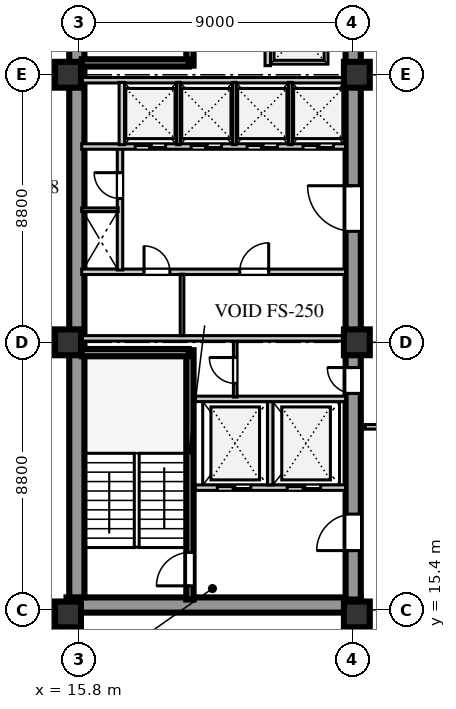
"""IFC4 building model, lengths in metres.
Left out: names, types, materials, properties, quantities, classifications, styles, units other than length and angle.
Written with IfcOpenShell. Run it as: python <this file> out.ifc"""

import sys

from ifc_helpers import new_model, si_unit, direction, frame, frame_2d, origin, origin_2d, place, context, subcontext, project, spatial, rectangle, extrude, element, fill, save


model = new_model("IFC4")
c1 = context("Model", 3, precision=1e-05, world=origin(), true_north=direction((0.0, 1.0)))
c2 = subcontext(c1, "Body", "Model", "MODEL_VIEW")
j1 = project(units=[si_unit("LENGTHUNIT", "METRE"), si_unit("PLANEANGLEUNIT", "RADIAN")], contexts=[c1])
p1 = place(None, origin())
s1 = spatial("IfcSite", under=j1, at=p1, CompositionType="ELEMENT")
p2 = place(p1, origin())
s2 = spatial("IfcBuilding", under=s1, at=p2, CompositionType="ELEMENT")
p3 = place(p2, frame((0.0, 0.0, 134.8)))
s3 = spatial("IfcBuildingStorey", under=s2, at=p3, CompositionType="ELEMENT", Elevation=134.8)
p4 = place(p3, frame((15.4, 15.56, 0.0), z_axis=(0.0, 0.0, 1.0), x_axis=(1.0, 0.0, 0.0)))
e1 = element("IfcWall", 1, at=p4, inside=s3, PredefinedType="SHEAR", context=c2, shape_type="SweptSolid", body=[
    extrude(rectangle(XDim=9.68, YDim=0.5, at=frame_2d((4.84, 0.0))), origin(), (0.0, 0.0, 1.0), 3.6),
])
p5 = place(p3, frame((15.74, 15.81, 0.0), z_axis=(0.0, 0.0, 1.0), x_axis=(0.0, 1.0, 0.0)))
e2 = element("IfcWall", 2, at=p5, inside=s3, PredefinedType="SHEAR", context=c2, shape_type="SweptSolid", body=[
    extrude(rectangle(XDim=25.63, YDim=0.5, at=frame_2d((12.815, 0.0))), origin(), (0.0, 0.0, 1.0), 3.6),
])
p6 = place(p3, frame((24.83, 15.74, 0.0), z_axis=(0.0, 0.0, 1.0), x_axis=(0.0, 1.0, 0.0)))
e3 = element("IfcWall", 3, at=p6, inside=s3, PredefinedType="SHEAR", context=c2, shape_type="SweptSolid", body=[
    extrude(rectangle(XDim=25.76, YDim=0.5, at=frame_2d((12.88, 0.0))), origin(), (0.0, 0.0, 1.0), 3.6),
])
p7 = place(p6, frame((1.61, 0.0, 0.0)))
e4 = element("IfcOpeningElement", 4, at=p7, cuts=e3, PredefinedType="OPENING", context=c2, shape_type="SweptSolid", body=[
    extrude(rectangle(XDim=1.2, YDim=2.1, at=frame_2d((0.6, 1.05))), frame((0.0, 0.26, 0.0), z_axis=(0.0, -1.0, 0.0), x_axis=(1.0, 0.0, 0.0)), (0.0, 0.0, 1.0), 0.52),
])
p8 = place(p6, frame((6.78, 0.0, 0.0)))
e5 = element("IfcOpeningElement", 5, at=p8, cuts=e3, PredefinedType="OPENING", context=c2, shape_type="SweptSolid", body=[
    extrude(rectangle(XDim=0.85, YDim=2.06, at=frame_2d((0.425, 1.03))), frame((0.0, 0.26, 0.0), z_axis=(0.0, -1.0, 0.0), x_axis=(1.0, 0.0, 0.0)), (0.0, 0.0, 1.0), 0.52),
])
p9 = place(p6, frame((12.11, 0.0, 0.0)))
e6 = element("IfcOpeningElement", 6, at=p9, cuts=e3, PredefinedType="OPENING", context=c2, shape_type="SweptSolid", body=[
    extrude(rectangle(XDim=1.5, YDim=2.12, at=frame_2d((0.75, 1.06))), frame((0.0, 0.26, 0.0), z_axis=(0.0, -1.0, 0.0), x_axis=(1.0, 0.0, 0.0)), (0.0, 0.0, 1.0), 0.52),
])
p10 = place(p6, frame((20.11, 0.0, 0.0)))
e7 = element("IfcOpeningElement", 7, at=p10, cuts=e3, PredefinedType="OPENING", context=c2, shape_type="SweptSolid", body=[
    extrude(rectangle(XDim=1.2, YDim=2.12, at=frame_2d((0.6, 1.06))), frame((0.0, 0.26, 0.0), z_axis=(0.0, -1.0, 0.0), x_axis=(1.0, 0.0, 0.0)), (0.0, 0.0, 1.0), 0.52),
])
p11 = place(p6, frame((24.01, 0.0, 0.0)))
e8 = element("IfcOpeningElement", 8, at=p11, cuts=e3, PredefinedType="OPENING", context=c2, shape_type="SweptSolid", body=[
    extrude(rectangle(XDim=0.95, YDim=2.1, at=frame_2d((0.475, 1.05))), frame((0.0, 0.26, 0.0), z_axis=(0.0, -1.0, 0.0), x_axis=(1.0, 0.0, 0.0)), (0.0, 0.0, 1.0), 0.52),
])
for number, where, z_axis, x_axis in (
    (9, (15.45, 15.25, 0.0), (0.0, 0.0, 1.0), (1.0, 0.0, 0.0)),
    (10, (15.45, 24.2, 0.0), (0.0, 0.0, 1.0), (1.0, 0.0, 0.0)),
    (11, (15.45, 33.0, 0.0), (0.0, 0.0, 1.0), (1.0, 0.0, 0.0)),
    (12, (24.95, 15.25, 0.0), (0.0, 0.0, 1.0), (1.0, 0.0, 0.0)),
    (13, (24.95, 24.2, 0.0), (0.0, 0.0, 1.0), (1.0, 0.0, 0.0)),
    (14, (24.95, 33.0, 0.0), (0.0, 0.0, 1.0), (1.0, 0.0, 0.0)),
):
    element("IfcColumn", number, at=place(p3, frame(where, z_axis=z_axis, x_axis=x_axis)), inside=s3, PredefinedType="COLUMN", context=c2, shape_type="SweptSolid", body=[
        extrude(rectangle(XDim=0.85, YDim=0.85, at=origin_2d()), origin(), (0.0, 0.0, 1.0), 3.6),
    ])
p12 = place(p3, frame((19.46, 15.74, 0.0), z_axis=(0.0, 0.0, 1.0), x_axis=(0.0, 1.0, 0.0)))
e15 = element("IfcWall", 15, at=p12, inside=s3, PredefinedType="SHEAR", context=c2, shape_type="SweptSolid", body=[
    extrude(rectangle(XDim=8.2, YDim=0.24, at=frame_2d((4.1, 0.0))), origin(), (0.0, 0.0, 1.0), 3.85),
])
p13 = place(p12, frame((0.45, 0.0, 0.0)))
e16 = element("IfcOpeningElement", 16, at=p13, cuts=e15, PredefinedType="OPENING", context=c2, shape_type="SweptSolid", body=[
    extrude(rectangle(XDim=1.1, YDim=2.1, at=frame_2d((0.55, 1.05))), frame((0.0, 0.13, 0.0), z_axis=(0.0, -1.0, 0.0), x_axis=(1.0, 0.0, 0.0)), (0.0, 0.0, 1.0), 0.26),
])
p14 = place(p3, frame((15.9, 23.86, 0.0), z_axis=(0.0, 0.0, 1.0), x_axis=(1.0, 0.0, 0.0)))
e17 = element("IfcWall", 17, at=p14, inside=s3, PredefinedType="SHEAR", context=c2, shape_type="SweptSolid", body=[
    extrude(rectangle(XDim=3.52, YDim=0.24, at=frame_2d((1.76, 0.0))), origin(), (0.0, 0.0, 1.0), 3.85),
])
p15 = place(p3, frame((19.64, 19.42, 0.0), z_axis=(0.0, 0.0, 1.0), x_axis=(1.0, 0.0, 0.0)))
e18 = element("IfcWall", 18, at=p15, inside=s3, PredefinedType="SOLIDWALL", context=c2, shape_type="SweptSolid", body=[
    extrude(rectangle(XDim=4.94, YDim=0.18, at=frame_2d((2.47, 0.0))), origin(), (0.0, 0.0, 1.0), 3.6),
])
p16 = place(p15, frame((0.72, 0.0, 0.0)))
e19 = element("IfcOpeningElement", 19, at=p16, cuts=e18, PredefinedType="OPENING", context=c2, shape_type="SweptSolid", body=[
    extrude(rectangle(XDim=1.1, YDim=2.1, at=frame_2d((0.55, 1.05))), frame((0.0, 0.1, 0.0), z_axis=(0.0, -1.0, 0.0), x_axis=(1.0, 0.0, 0.0)), (0.0, 0.0, 1.0), 0.2),
])
p17 = place(p15, frame((3.02, 0.0, 0.0)))
e20 = element("IfcOpeningElement", 20, at=p17, cuts=e18, PredefinedType="OPENING", context=c2, shape_type="SweptSolid", body=[
    extrude(rectangle(XDim=1.1, YDim=2.1, at=frame_2d((0.55, 1.05))), frame((0.0, 0.1, 0.0), z_axis=(0.0, -1.0, 0.0), x_axis=(1.0, 0.0, 0.0)), (0.0, 0.0, 1.0), 0.2),
])
p18 = place(p3, frame((22.1, 19.51, 0.0), z_axis=(0.0, 0.0, 1.0), x_axis=(0.0, 1.0, 0.0)))
e21 = element("IfcWall", 21, at=p18, inside=s3, PredefinedType="SOLIDWALL", context=c2, shape_type="SweptSolid", body=[
    extrude(rectangle(XDim=2.74, YDim=0.18, at=frame_2d((1.37, 0.0))), origin(), (0.0, 0.0, 1.0), 3.6),
])
p19 = place(p3, frame((19.64, 22.34, 0.0), z_axis=(0.0, 0.0, 1.0), x_axis=(1.0, 0.0, 0.0)))
e22 = element("IfcWall", 22, at=p19, inside=s3, PredefinedType="SOLIDWALL", context=c2, shape_type="SweptSolid", body=[
    extrude(rectangle(XDim=4.94, YDim=0.18, at=frame_2d((2.47, 0.0))), origin(), (0.0, 0.0, 1.0), 3.6),
])
p20 = place(p3, frame((20.95, 22.4, 0.0), z_axis=(0.0, 0.0, 1.0), x_axis=(0.0, 1.0, 0.0)))
e23 = element("IfcWall", 23, at=p20, inside=s3, PredefinedType="PARTITIONING", context=c2, shape_type="SweptSolid", body=[
    extrude(rectangle(XDim=1.88, YDim=0.12, at=frame_2d((0.94, 0.0))), origin(), (0.0, 0.0, 1.0), 3.6),
])
p21 = place(p20, frame((0.45, 0.0, 0.0)))
e24 = element("IfcOpeningElement", 24, at=p21, cuts=e23, PredefinedType="OPENING", context=c2, shape_type="SweptSolid", body=[
    extrude(rectangle(XDim=0.85, YDim=2.06, at=frame_2d((0.425, 1.03))), frame((0.0, 0.07, 0.0), z_axis=(0.0, -1.0, 0.0), x_axis=(1.0, 0.0, 0.0)), (0.0, 0.0, 1.0), 0.14),
])
p22 = place(p3, frame((15.9, 26.52, 0.0), z_axis=(0.0, 0.0, 1.0), x_axis=(1.0, 0.0, 0.0)))
e25 = element("IfcWall", 25, at=p22, inside=s3, PredefinedType="SOLIDWALL", context=c2, shape_type="SweptSolid", body=[
    extrude(rectangle(XDim=8.68, YDim=0.18, at=frame_2d((4.34, 0.0))), origin(), (0.0, 0.0, 1.0), 3.6),
])
p23 = place(p22, frame((2.05, 0.0, 0.0)))
e26 = element("IfcOpeningElement", 26, at=p23, cuts=e25, PredefinedType="OPENING", context=c2, shape_type="SweptSolid", body=[
    extrude(rectangle(XDim=0.85, YDim=2.06, at=frame_2d((0.425, 1.03))), frame((0.0, 0.1, 0.0), z_axis=(0.0, -1.0, 0.0), x_axis=(1.0, 0.0, 0.0)), (0.0, 0.0, 1.0), 0.2),
])
p24 = place(p22, frame((5.2, 0.0, 0.0)))
e27 = element("IfcOpeningElement", 27, at=p24, cuts=e25, PredefinedType="OPENING", context=c2, shape_type="SweptSolid", body=[
    extrude(rectangle(XDim=0.95, YDim=2.1, at=frame_2d((0.475, 1.05))), frame((0.0, 0.1, 0.0), z_axis=(0.0, -1.0, 0.0), x_axis=(1.0, 0.0, 0.0)), (0.0, 0.0, 1.0), 0.2),
])
p25 = place(p3, frame((15.9, 24.33, 0.0), z_axis=(0.0, 0.0, 1.0), x_axis=(1.0, 0.0, 0.0)))
e28 = element("IfcWall", 28, at=p25, inside=s3, PredefinedType="SOLIDWALL", context=c2, shape_type="SweptSolid", body=[
    extrude(rectangle(XDim=8.68, YDim=0.18, at=frame_2d((4.34, 0.0))), origin(), (0.0, 0.0, 1.0), 2.95),
])
p26 = place(p3, frame((19.2, 24.42, 0.0), z_axis=(0.0, 0.0, 1.0), x_axis=(0.0, 1.0, 0.0)))
e29 = element("IfcWall", 29, at=p26, inside=s3, PredefinedType="PARTITIONING", context=c2, shape_type="SweptSolid", body=[
    extrude(rectangle(XDim=2.02, YDim=0.12, at=frame_2d((1.01, 0.0))), origin(), (0.0, 0.0, 1.0), 3.6),
])
p27 = place(p3, frame((17.16, 26.58, 0.0), z_axis=(0.0, 0.0, 1.0), x_axis=(0.0, 1.0, 0.0)))
e30 = element("IfcWall", 30, at=p27, inside=s3, PredefinedType="SOLIDWALL", context=c2, shape_type="SweptSolid", body=[
    extrude(rectangle(XDim=4.02, YDim=0.18, at=frame_2d((2.01, 0.0))), origin(), (0.0, 0.0, 1.0), 3.6),
])
p28 = place(p27, frame((2.35, 0.0, 0.0)))
e31 = element("IfcOpeningElement", 31, at=p28, cuts=e30, PredefinedType="OPENING", context=c2, shape_type="SweptSolid", body=[
    extrude(rectangle(XDim=0.85, YDim=2.06, at=frame_2d((0.425, 1.03))), frame((0.0, 0.1, 0.0), z_axis=(0.0, -1.0, 0.0), x_axis=(1.0, 0.0, 0.0)), (0.0, 0.0, 1.0), 0.2),
])
p29 = place(p3, frame((15.9, 28.56, 0.0), z_axis=(0.0, 0.0, 1.0), x_axis=(1.0, 0.0, 0.0)))
e32 = element("IfcWall", 32, at=p29, inside=s3, PredefinedType="PARTITIONING", context=c2, shape_type="SweptSolid", body=[
    extrude(rectangle(XDim=1.2, YDim=0.12, at=frame_2d((0.6, 0.0))), origin(), (0.0, 0.0, 1.0), 3.6),
])
p30 = place(p3, frame((15.9, 30.64, 0.0), z_axis=(0.0, 0.0, 1.0), x_axis=(1.0, 0.0, 0.0)))
e33 = element("IfcWall", 33, at=p30, inside=s3, PredefinedType="SOLIDWALL", context=c2, shape_type="SweptSolid", body=[
    extrude(rectangle(XDim=8.68, YDim=0.18, at=frame_2d((4.34, 0.0))), origin(), (0.0, 0.0, 1.0), 3.6),
])
p31 = place(p30, frame((1.76, 0.0, 0.0)))
e34 = element("IfcOpeningElement", 34, at=p31, cuts=e33, PredefinedType="OPENING", context=c2, shape_type="SweptSolid", body=[
    extrude(rectangle(XDim=1.0, YDim=2.1, at=frame_2d((0.5, 1.05))), frame((0.0, 0.1, 0.0), z_axis=(0.0, -1.0, 0.0), x_axis=(1.0, 0.0, 0.0)), (0.0, 0.0, 1.0), 0.2),
])
p32 = place(p30, frame((3.6, 0.0, 0.0)))
e35 = element("IfcOpeningElement", 35, at=p32, cuts=e33, PredefinedType="OPENING", context=c2, shape_type="SweptSolid", body=[
    extrude(rectangle(XDim=1.0, YDim=2.1, at=frame_2d((0.5, 1.05))), frame((0.0, 0.1, 0.0), z_axis=(0.0, -1.0, 0.0), x_axis=(1.0, 0.0, 0.0)), (0.0, 0.0, 1.0), 0.2),
])
p33 = place(p30, frame((5.44, 0.0, 0.0)))
e36 = element("IfcOpeningElement", 36, at=p33, cuts=e33, PredefinedType="OPENING", context=c2, shape_type="SweptSolid", body=[
    extrude(rectangle(XDim=1.0, YDim=2.1, at=frame_2d((0.5, 1.05))), frame((0.0, 0.1, 0.0), z_axis=(0.0, -1.0, 0.0), x_axis=(1.0, 0.0, 0.0)), (0.0, 0.0, 1.0), 0.2),
])
p34 = place(p30, frame((7.28, 0.0, 0.0)))
e37 = element("IfcOpeningElement", 37, at=p34, cuts=e33, PredefinedType="OPENING", context=c2, shape_type="SweptSolid", body=[
    extrude(rectangle(XDim=1.0, YDim=2.1, at=frame_2d((0.5, 1.05))), frame((0.0, 0.1, 0.0), z_axis=(0.0, -1.0, 0.0), x_axis=(1.0, 0.0, 0.0)), (0.0, 0.0, 1.0), 0.2),
])
p35 = place(p3, frame((15.9, 32.82, 0.0), z_axis=(0.0, 0.0, 1.0), x_axis=(1.0, 0.0, 0.0)))
e38 = element("IfcWall", 38, at=p35, inside=s3, PredefinedType="SOLIDWALL", context=c2, shape_type="SweptSolid", body=[
    extrude(rectangle(XDim=8.68, YDim=0.18, at=frame_2d((4.34, 0.0))), origin(), (0.0, 0.0, 1.0), 2.95),
])
p36 = place(p3, frame((17.22, 30.7, 0.0), z_axis=(0.0, 0.0, 1.0), x_axis=(0.0, 1.0, 0.0)))
e39 = element("IfcWall", 39, at=p36, inside=s3, PredefinedType="SOLIDWALL", context=c2, shape_type="SweptSolid", body=[
    extrude(rectangle(XDim=2.05, YDim=0.18, at=frame_2d((1.025, 0.0))), origin(), (0.0, 0.0, 1.0), 3.6),
])
for number, where, z_axis, x_axis in (
    (40, (19.08, 30.7, 0.0), (0.0, 0.0, 1.0), (0.0, 1.0, 0.0)),
    (41, (20.92, 30.7, 0.0), (0.0, 0.0, 1.0), (0.0, 1.0, 0.0)),
    (42, (22.76, 30.7, 0.0), (0.0, 0.0, 1.0), (0.0, 1.0, 0.0)),
):
    element("IfcWall", number, at=place(p3, frame(where, z_axis=z_axis, x_axis=x_axis)), inside=s3, PredefinedType="PARTITIONING", context=c2, shape_type="SweptSolid", body=[
        extrude(rectangle(XDim=2.05, YDim=0.12, at=frame_2d((1.025, 0.0))), origin(), (0.0, 0.0, 1.0), 3.6),
    ])
p37 = place(p3, frame((19.46, 33.3, 0.0), z_axis=(0.0, 0.0, 1.0), x_axis=(0.0, 1.0, 0.0)))
e43 = element("IfcWall", 43, at=p37, inside=s3, PredefinedType="SHEAR", context=c2, shape_type="SweptSolid", body=[
    extrude(rectangle(XDim=8.18, YDim=0.24, at=frame_2d((4.09, 0.0))), origin(), (0.0, 0.0, 1.0), 3.85),
])
p38 = place(p37, frame((0.65, 0.0, 0.0)))
e44 = element("IfcOpeningElement", 44, at=p38, cuts=e43, PredefinedType="OPENING", context=c2, shape_type="SweptSolid", body=[
    extrude(rectangle(XDim=1.1, YDim=2.1, at=frame_2d((0.55, 1.05))), frame((0.0, 0.13, 0.0), z_axis=(0.0, -1.0, 0.0), x_axis=(1.0, 0.0, 0.0)), (0.0, 0.0, 1.0), 0.26),
])
p39 = place(p3, frame((15.9, 33.39, 0.0), z_axis=(0.0, 0.0, 1.0), x_axis=(1.0, 0.0, 0.0)))
e45 = element("IfcWall", 45, at=p39, inside=s3, PredefinedType="SHEAR", context=c2, shape_type="SweptSolid", body=[
    extrude(rectangle(XDim=3.52, YDim=0.24, at=frame_2d((1.76, 0.0))), origin(), (0.0, 0.0, 1.0), 3.85),
])
p40 = place(p3, frame((22.02, 33.3, 0.0), z_axis=(0.0, 0.0, 1.0), x_axis=(0.0, 1.0, 0.0)))
e46 = element("IfcWall", 46, at=p40, inside=s3, PredefinedType="SOLIDWALL", context=c2, shape_type="SweptSolid", body=[
    extrude(rectangle(XDim=2.01, YDim=0.18, at=frame_2d((1.005, 0.0))), origin(), (0.0, 0.0, 1.0), 3.6),
])
p41 = place(p3, frame((25.22, 21.42, 0.0), z_axis=(0.0, 0.0, 1.0), x_axis=(1.0, 0.0, 0.0)))
e47 = element("IfcWall", 47, at=p41, inside=s3, PredefinedType="PARTITIONING", context=c2, shape_type="SweptSolid", body=[
    extrude(rectangle(XDim=15.6, YDim=0.15, at=frame_2d((7.8, 0.0))), origin(), (0.0, 0.0, 1.0), 3.2),
])
p42 = place(p41, frame((0.73, 0.0, 0.0)))
e48 = element("IfcOpeningElement", 48, at=p42, cuts=e47, PredefinedType="OPENING", context=c2, shape_type="SweptSolid", body=[
    extrude(rectangle(XDim=0.95, YDim=2.1, at=frame_2d((0.475, 1.05))), frame((0.0, 0.085, 0.0), z_axis=(0.0, -1.0, 0.0), x_axis=(1.0, 0.0, 0.0)), (0.0, 0.0, 1.0), 0.17),
])
p43 = place(p41, frame((5.23, 0.0, 0.0)))
e49 = element("IfcOpeningElement", 49, at=p43, cuts=e47, PredefinedType="OPENING", context=c2, shape_type="SweptSolid", body=[
    extrude(rectangle(XDim=0.95, YDim=2.1, at=frame_2d((0.475, 1.05))), frame((0.0, 0.085, 0.0), z_axis=(0.0, -1.0, 0.0), x_axis=(1.0, 0.0, 0.0)), (0.0, 0.0, 1.0), 0.17),
])
p44 = place(p41, frame((10.83, 0.0, 0.0)))
e50 = element("IfcOpeningElement", 50, at=p44, cuts=e47, PredefinedType="OPENING", context=c2, shape_type="SweptSolid", body=[
    extrude(rectangle(XDim=0.95, YDim=2.1, at=frame_2d((0.475, 1.05))), frame((0.0, 0.085, 0.0), z_axis=(0.0, -1.0, 0.0), x_axis=(1.0, 0.0, 0.0)), (0.0, 0.0, 1.0), 0.17),
])
p45 = place(p13, origin())
e51 = element("IfcDoor", 51, at=p45, inside=s3, OperationType="SINGLE_SWING_LEFT", PredefinedType="DOOR", context=c2, shape_type="SweptSolid", body=[
    extrude(rectangle(XDim=1.1, YDim=2.1, at=frame_2d((0.55, 1.05))), frame((0.0, 0.025, 0.0), z_axis=(0.0, -1.0, 0.0), x_axis=(1.0, 0.0, 0.0)), (0.0, 0.0, 1.0), 0.05),
])
fill(e16, e51)
p46 = place(p16, origin())
e52 = element("IfcDoor", 52, at=p46, inside=s3, OperationType="DOUBLE_DOOR_SLIDING", PredefinedType="DOOR", context=c2, shape_type="SweptSolid", body=[
    extrude(rectangle(XDim=1.1, YDim=2.1, at=frame_2d((0.55, 1.05))), frame((0.0, 0.025, 0.0), z_axis=(0.0, -1.0, 0.0), x_axis=(1.0, 0.0, 0.0)), (0.0, 0.0, 1.0), 0.05),
])
fill(e19, e52)
p47 = place(p17, origin())
e53 = element("IfcDoor", 53, at=p47, inside=s3, OperationType="DOUBLE_DOOR_SLIDING", PredefinedType="DOOR", context=c2, shape_type="SweptSolid", body=[
    extrude(rectangle(XDim=1.1, YDim=2.1, at=frame_2d((0.55, 1.05))), frame((0.0, 0.025, 0.0), z_axis=(0.0, -1.0, 0.0), x_axis=(1.0, 0.0, 0.0)), (0.0, 0.0, 1.0), 0.05),
])
fill(e20, e53)
p48 = place(p7, frame((1.2, 0.0, 0.0), z_axis=(0.0, 0.0, 1.0), x_axis=(-1.0, 0.0, 0.0)))
e54 = element("IfcDoor", 54, at=p48, inside=s3, OperationType="SINGLE_SWING_RIGHT", PredefinedType="DOOR", context=c2, shape_type="SweptSolid", body=[
    extrude(rectangle(XDim=1.2, YDim=2.1, at=frame_2d((0.6, 1.05))), frame((0.0, 0.025, 0.0), z_axis=(0.0, -1.0, 0.0), x_axis=(1.0, 0.0, 0.0)), (0.0, 0.0, 1.0), 0.05),
])
fill(e4, e54)
p49 = place(p21, origin())
e55 = element("IfcDoor", 55, at=p49, inside=s3, OperationType="SINGLE_SWING_RIGHT", PredefinedType="DOOR", context=c2, shape_type="SweptSolid", body=[
    extrude(rectangle(XDim=0.85, YDim=2.06, at=frame_2d((0.425, 1.03))), frame((0.0, 0.025, 0.0), z_axis=(0.0, -1.0, 0.0), x_axis=(1.0, 0.0, 0.0)), (0.0, 0.0, 1.0), 0.05),
])
fill(e24, e55)
p50 = place(p8, frame((0.85, 0.0, 0.0), z_axis=(0.0, 0.0, 1.0), x_axis=(-1.0, 0.0, 0.0)))
e56 = element("IfcDoor", 56, at=p50, inside=s3, OperationType="SINGLE_SWING_LEFT", PredefinedType="DOOR", context=c2, shape_type="SweptSolid", body=[
    extrude(rectangle(XDim=0.85, YDim=2.06, at=frame_2d((0.425, 1.03))), frame((0.0, 0.025, 0.0), z_axis=(0.0, -1.0, 0.0), x_axis=(1.0, 0.0, 0.0)), (0.0, 0.0, 1.0), 0.05),
])
fill(e5, e56)
p51 = place(p23, origin())
e57 = element("IfcDoor", 57, at=p51, inside=s3, OperationType="SINGLE_SWING_LEFT", PredefinedType="DOOR", context=c2, shape_type="SweptSolid", body=[
    extrude(rectangle(XDim=0.85, YDim=2.06, at=frame_2d((0.425, 1.03))), frame((0.0, 0.025, 0.0), z_axis=(0.0, -1.0, 0.0), x_axis=(1.0, 0.0, 0.0)), (0.0, 0.0, 1.0), 0.05),
])
fill(e26, e57)
p52 = place(p24, origin())
e58 = element("IfcDoor", 58, at=p52, inside=s3, OperationType="SINGLE_SWING_RIGHT", PredefinedType="DOOR", context=c2, shape_type="SweptSolid", body=[
    extrude(rectangle(XDim=0.95, YDim=2.1, at=frame_2d((0.475, 1.05))), frame((0.0, 0.025, 0.0), z_axis=(0.0, -1.0, 0.0), x_axis=(1.0, 0.0, 0.0)), (0.0, 0.0, 1.0), 0.05),
])
fill(e27, e58)
p53 = place(p28, origin())
e59 = element("IfcDoor", 59, at=p53, inside=s3, OperationType="SINGLE_SWING_RIGHT", PredefinedType="DOOR", context=c2, shape_type="SweptSolid", body=[
    extrude(rectangle(XDim=0.85, YDim=2.06, at=frame_2d((0.425, 1.03))), frame((0.0, 0.025, 0.0), z_axis=(0.0, -1.0, 0.0), x_axis=(1.0, 0.0, 0.0)), (0.0, 0.0, 1.0), 0.05),
])
fill(e31, e59)
p54 = place(p9, frame((1.5, 0.0, 0.0), z_axis=(0.0, 0.0, 1.0), x_axis=(-1.0, 0.0, 0.0)))
e60 = element("IfcDoor", 60, at=p54, inside=s3, OperationType="SINGLE_SWING_LEFT", PredefinedType="DOOR", context=c2, shape_type="SweptSolid", body=[
    extrude(rectangle(XDim=1.5, YDim=2.12, at=frame_2d((0.75, 1.06))), frame((0.0, 0.025, 0.0), z_axis=(0.0, -1.0, 0.0), x_axis=(1.0, 0.0, 0.0)), (0.0, 0.0, 1.0), 0.05),
])
fill(e6, e60)
p55 = place(p31, frame((1.0, 0.0, 0.0), z_axis=(0.0, 0.0, 1.0), x_axis=(-1.0, 0.0, 0.0)))
e61 = element("IfcDoor", 61, at=p55, inside=s3, OperationType="DOUBLE_DOOR_SLIDING", PredefinedType="DOOR", context=c2, shape_type="SweptSolid", body=[
    extrude(rectangle(XDim=1.0, YDim=2.1, at=frame_2d((0.5, 1.05))), frame((0.0, 0.025, 0.0), z_axis=(0.0, -1.0, 0.0), x_axis=(1.0, 0.0, 0.0)), (0.0, 0.0, 1.0), 0.05),
])
fill(e34, e61)
p56 = place(p32, frame((1.0, 0.0, 0.0), z_axis=(0.0, 0.0, 1.0), x_axis=(-1.0, 0.0, 0.0)))
e62 = element("IfcDoor", 62, at=p56, inside=s3, OperationType="DOUBLE_DOOR_SLIDING", PredefinedType="DOOR", context=c2, shape_type="SweptSolid", body=[
    extrude(rectangle(XDim=1.0, YDim=2.1, at=frame_2d((0.5, 1.05))), frame((0.0, 0.025, 0.0), z_axis=(0.0, -1.0, 0.0), x_axis=(1.0, 0.0, 0.0)), (0.0, 0.0, 1.0), 0.05),
])
fill(e35, e62)
p57 = place(p33, frame((1.0, 0.0, 0.0), z_axis=(0.0, 0.0, 1.0), x_axis=(-1.0, 0.0, 0.0)))
e63 = element("IfcDoor", 63, at=p57, inside=s3, OperationType="DOUBLE_DOOR_SLIDING", PredefinedType="DOOR", context=c2, shape_type="SweptSolid", body=[
    extrude(rectangle(XDim=1.0, YDim=2.1, at=frame_2d((0.5, 1.05))), frame((0.0, 0.025, 0.0), z_axis=(0.0, -1.0, 0.0), x_axis=(1.0, 0.0, 0.0)), (0.0, 0.0, 1.0), 0.05),
])
fill(e36, e63)
p58 = place(p34, frame((1.0, 0.0, 0.0), z_axis=(0.0, 0.0, 1.0), x_axis=(-1.0, 0.0, 0.0)))
e64 = element("IfcDoor", 64, at=p58, inside=s3, OperationType="DOUBLE_DOOR_SLIDING", PredefinedType="DOOR", context=c2, shape_type="SweptSolid", body=[
    extrude(rectangle(XDim=1.0, YDim=2.1, at=frame_2d((0.5, 1.05))), frame((0.0, 0.025, 0.0), z_axis=(0.0, -1.0, 0.0), x_axis=(1.0, 0.0, 0.0)), (0.0, 0.0, 1.0), 0.05),
])
fill(e37, e64)
save(model, sys.argv[1])
